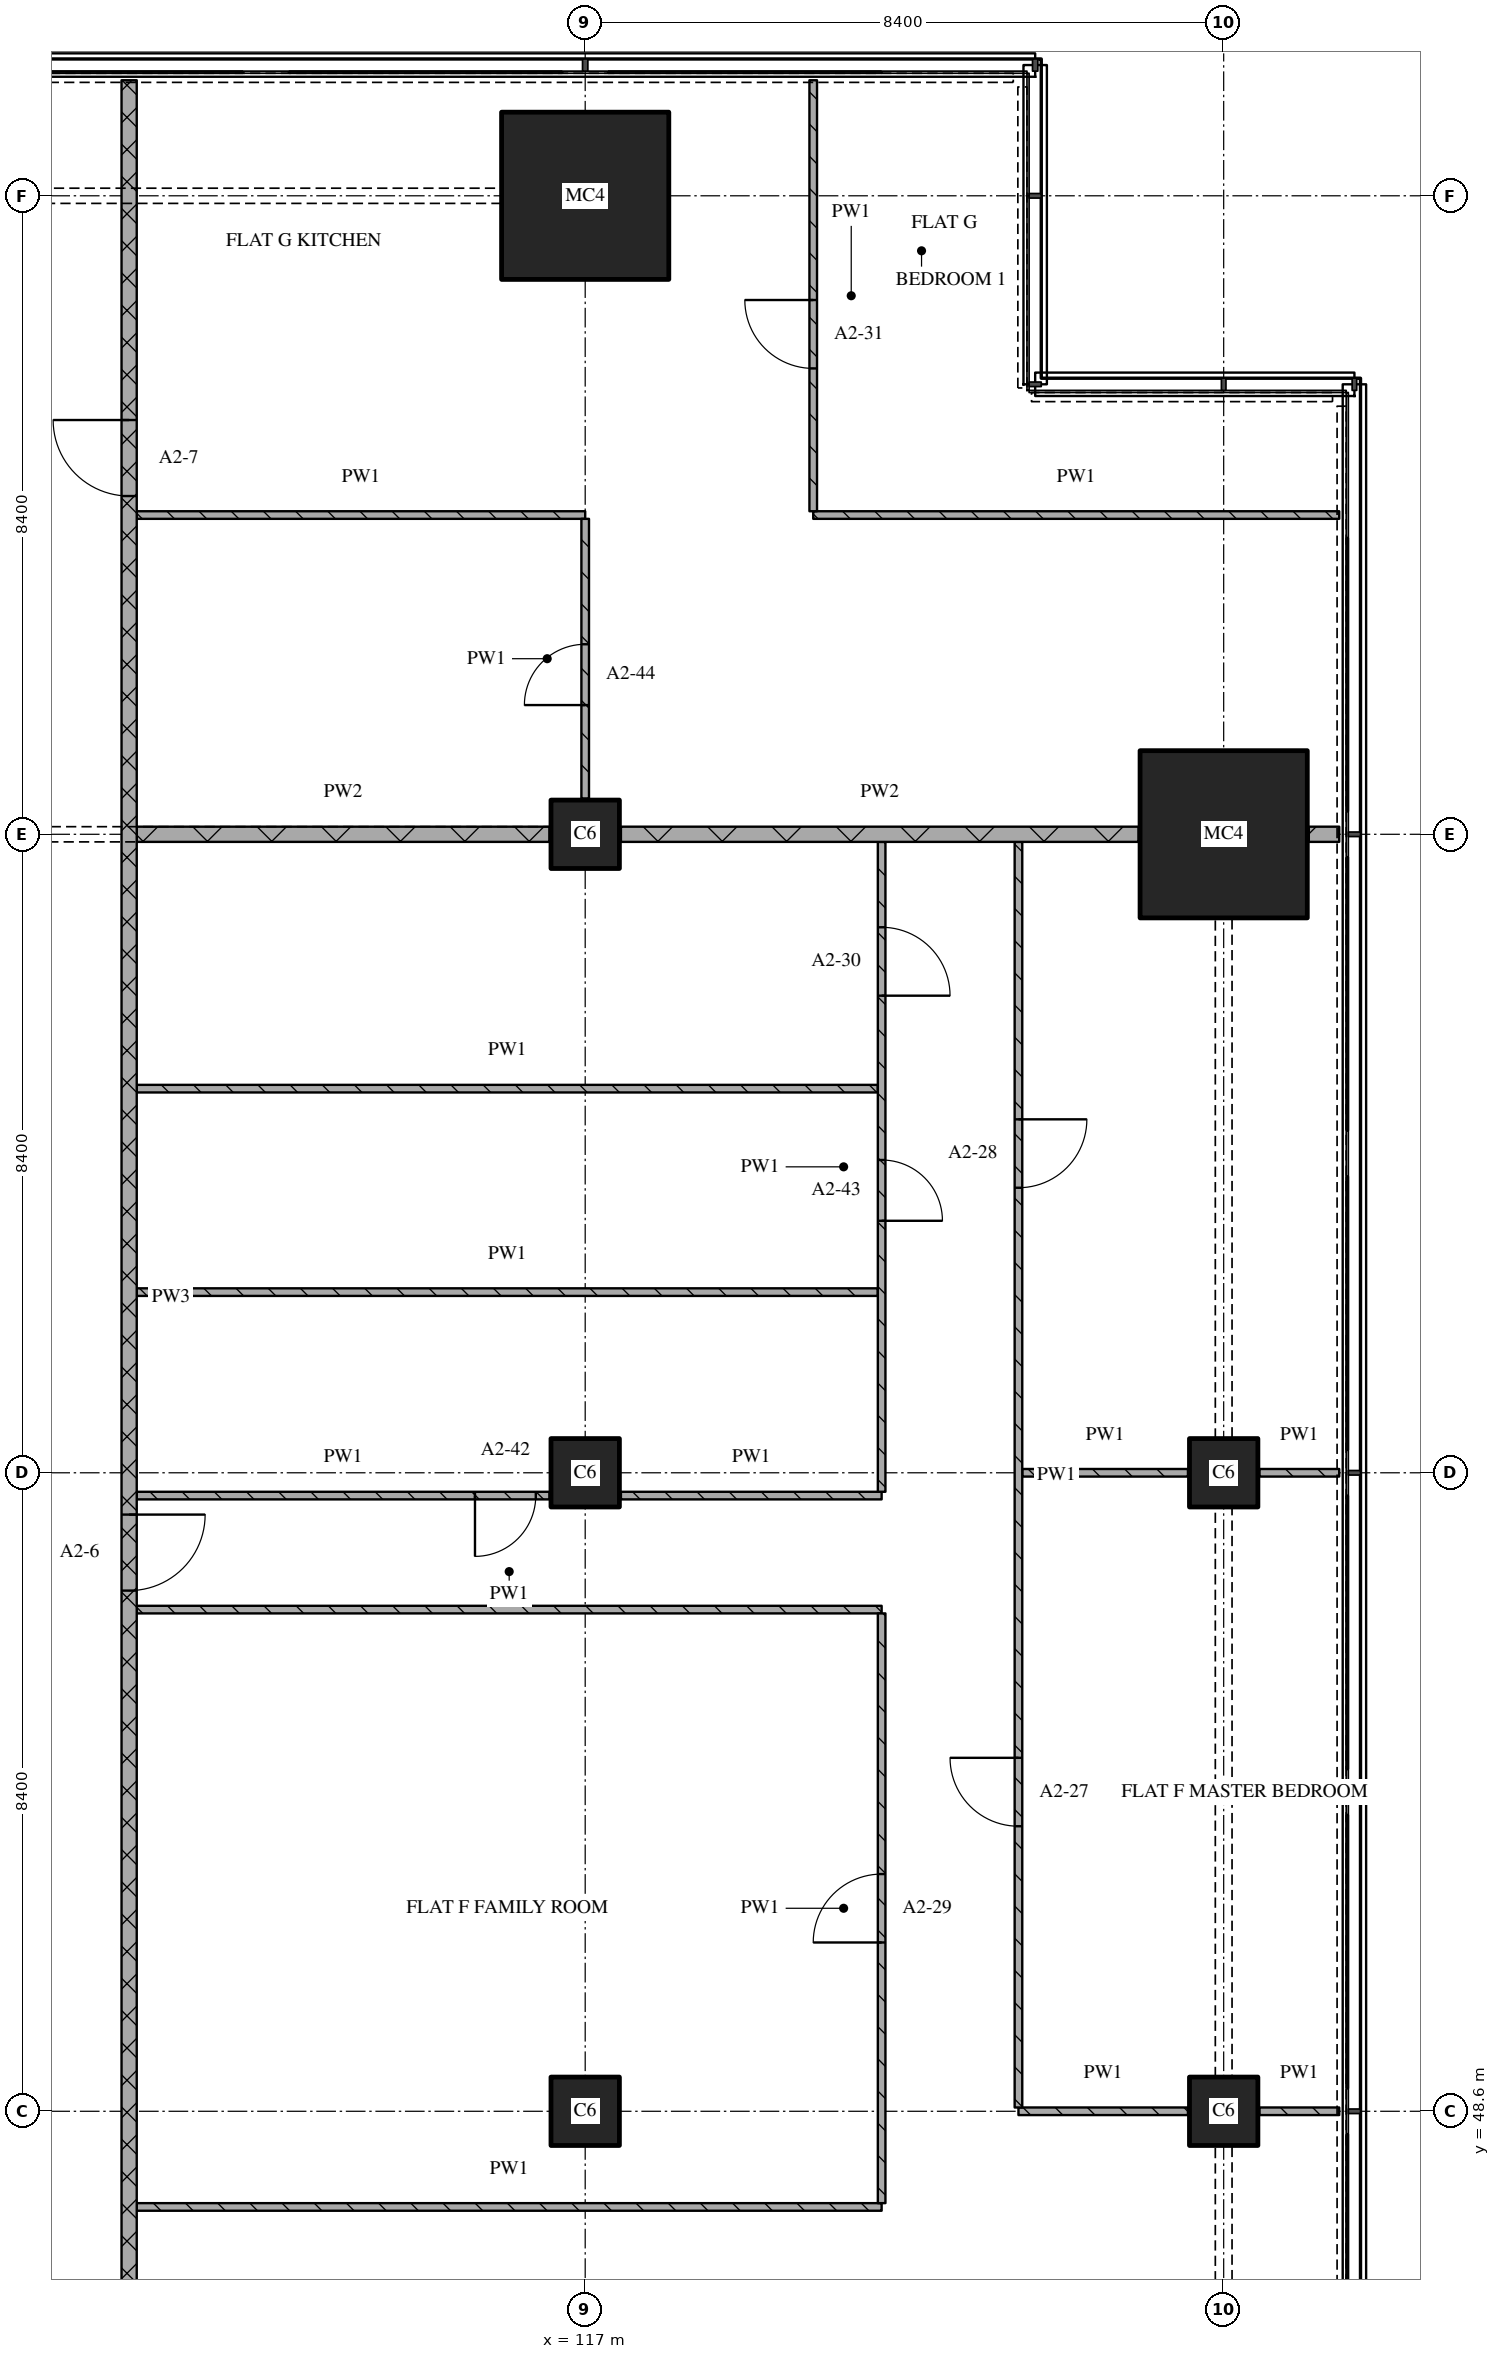
"""IFC4 building model, lengths in metres.
Left out: names, types, materials, properties, quantities, classifications, styles, units other than length and angle.
Written with IfcOpenShell. Run it as: python <this file> out.ifc"""

import sys

from ifc_helpers import new_model, si_unit, direction, frame, frame_2d, origin, origin_2d, place, context, subcontext, project, spatial, rectangle, extrude, element, fill, save


model = new_model("IFC4")
c1 = context("Model", 3, precision=1e-05, world=origin(), true_north=direction((0.0, 1.0)))
c2 = subcontext(c1, "Body", "Model", "MODEL_VIEW")
j1 = project(units=[si_unit("LENGTHUNIT", "METRE"), si_unit("PLANEANGLEUNIT", "RADIAN")], contexts=[c1])
p1 = place(None, origin())
s1 = spatial("IfcSite", under=j1, at=p1, CompositionType="ELEMENT")
p2 = place(p1, origin())
s2 = spatial("IfcBuilding", under=s1, at=p2, CompositionType="ELEMENT")
p3 = place(p2, frame((0.0, 0.0, 51.6)))
s3 = spatial("IfcBuildingStorey", under=s2, at=p3, CompositionType="ELEMENT", Elevation=51.6)
for number, where, z_axis, x_axis in (
    (1, (117.0, 48.6, 0.0), (0.0, 0.0, 1.0), (1.0, 0.0, 0.0)),
    (2, (117.0, 57.0, 0.0), (0.0, 0.0, 1.0), (1.0, 0.0, 0.0)),
    (3, (117.0, 65.4, 0.0), (0.0, 0.0, 1.0), (1.0, 0.0, 0.0)),
):
    element("IfcColumn", number, at=place(p3, frame(where, z_axis=z_axis, x_axis=x_axis)), inside=s3, PredefinedType="COLUMN", context=c2, shape_type="SweptSolid", body=[
        extrude(rectangle(XDim=0.9, YDim=0.9, at=origin_2d()), origin(), (0.0, 0.0, 1.0), 3.6),
    ])
p4 = place(p3, frame((117.0, 73.8, 0.0), z_axis=(0.0, 0.0, 1.0), x_axis=(1.0, 0.0, 0.0)))
e4 = element("IfcColumn", 4, at=p4, inside=s3, PredefinedType="COLUMN", context=c2, shape_type="SweptSolid", body=[
    extrude(rectangle(XDim=2.2, YDim=2.2, at=origin_2d()), origin(), (0.0, 0.0, 1.0), 3.6),
])
for number, where, z_axis, x_axis in (
    (5, (125.4, 48.6, 0.0), (0.0, 0.0, 1.0), (1.0, 0.0, 0.0)),
    (6, (125.4, 57.0, 0.0), (0.0, 0.0, 1.0), (1.0, 0.0, 0.0)),
):
    element("IfcColumn", number, at=place(p3, frame(where, z_axis=z_axis, x_axis=x_axis)), inside=s3, PredefinedType="COLUMN", context=c2, shape_type="SweptSolid", body=[
        extrude(rectangle(XDim=0.9, YDim=0.9, at=origin_2d()), origin(), (0.0, 0.0, 1.0), 3.6),
    ])
p5 = place(p3, frame((125.4, 65.4, 0.0), z_axis=(0.0, 0.0, 1.0), x_axis=(1.0, 0.0, 0.0)))
e7 = element("IfcColumn", 7, at=p5, inside=s3, PredefinedType="COLUMN", context=c2, shape_type="SweptSolid", body=[
    extrude(rectangle(XDim=2.2, YDim=2.2, at=origin_2d()), origin(), (0.0, 0.0, 1.0), 3.6),
])
p6 = place(p3, frame((111.1, 47.341, 0.0), z_axis=(0.0, 0.0, 1.0), x_axis=(1.0, 0.0, 0.0)))
e8 = element("IfcWall", 8, at=p6, inside=s3, PredefinedType="PARTITIONING", context=c2, shape_type="SweptSolid", body=[
    extrude(rectangle(XDim=9.8, YDim=0.1, at=frame_2d((4.9, 0.0))), origin(), (0.0, 0.0, 1.0), 3.32),
])
p7 = place(p3, frame((122.7, 48.6, 0.0), z_axis=(0.0, 0.0, 1.0), x_axis=(1.0, 0.0, 0.0)))
e9 = element("IfcWall", 9, at=p7, inside=s3, PredefinedType="PARTITIONING", context=c2, shape_type="SweptSolid", body=[
    extrude(rectangle(XDim=2.23, YDim=0.1, at=frame_2d((1.115, 0.0))), origin(), (0.0, 0.0, 1.0), 3.32),
])
p8 = place(p3, frame((125.87, 48.6, 0.0), z_axis=(0.0, 0.0, 1.0), x_axis=(1.0, 0.0, 0.0)))
e10 = element("IfcWall", 10, at=p8, inside=s3, PredefinedType="PARTITIONING", context=c2, shape_type="SweptSolid", body=[
    extrude(rectangle(XDim=1.05, YDim=0.1, at=frame_2d((0.525, 0.0))), origin(), (0.0, 0.0, 1.0), 3.32),
])
p9 = place(p3, frame((111.1, 55.2, 0.0), z_axis=(0.0, 0.0, 1.0), x_axis=(1.0, 0.0, 0.0)))
e11 = element("IfcWall", 11, at=p9, inside=s3, PredefinedType="PARTITIONING", context=c2, shape_type="SweptSolid", body=[
    extrude(rectangle(XDim=9.8, YDim=0.1, at=frame_2d((4.9, 0.0))), origin(), (0.0, 0.0, 1.0), 3.32),
])
p10 = place(p3, frame((111.1, 56.7, 0.0), z_axis=(0.0, 0.0, 1.0), x_axis=(1.0, 0.0, 0.0)))
e12 = element("IfcWall", 12, at=p10, inside=s3, PredefinedType="PARTITIONING", context=c2, shape_type="SweptSolid", body=[
    extrude(rectangle(XDim=5.43, YDim=0.1, at=frame_2d((2.715, 0.0))), origin(), (0.0, 0.0, 1.0), 3.32),
])
p11 = place(p10, frame((4.45, 0.0, 0.0)))
e13 = element("IfcOpeningElement", 13, at=p11, cuts=e12, PredefinedType="OPENING", context=c2, shape_type="SweptSolid", body=[
    extrude(rectangle(XDim=0.8, YDim=2.1, at=frame_2d((0.4, 1.05))), frame((0.0, 0.06, 0.0), z_axis=(0.0, -1.0, 0.0), x_axis=(1.0, 0.0, 0.0)), (0.0, 0.0, 1.0), 0.12),
])
p12 = place(p3, frame((117.47, 56.7, 0.0), z_axis=(0.0, 0.0, 1.0), x_axis=(1.0, 0.0, 0.0)))
e14 = element("IfcWall", 14, at=p12, inside=s3, PredefinedType="PARTITIONING", context=c2, shape_type="SweptSolid", body=[
    extrude(rectangle(XDim=3.43, YDim=0.1, at=frame_2d((1.715, 0.0))), origin(), (0.0, 0.0, 1.0), 3.32),
])
p13 = place(p3, frame((122.75, 57.0, 0.0), z_axis=(0.0, 0.0, 1.0), x_axis=(1.0, 0.0, 0.0)))
e15 = element("IfcWall", 15, at=p13, inside=s3, PredefinedType="PARTITIONING", context=c2, shape_type="SweptSolid", body=[
    extrude(rectangle(XDim=2.18, YDim=0.1, at=frame_2d((1.09, 0.0))), origin(), (0.0, 0.0, 1.0), 3.32),
])
p14 = place(p3, frame((125.87, 57.0, 0.0), z_axis=(0.0, 0.0, 1.0), x_axis=(1.0, 0.0, 0.0)))
e16 = element("IfcWall", 16, at=p14, inside=s3, PredefinedType="PARTITIONING", context=c2, shape_type="SweptSolid", body=[
    extrude(rectangle(XDim=1.05, YDim=0.1, at=frame_2d((0.525, 0.0))), origin(), (0.0, 0.0, 1.0), 3.32),
])
for number, where, z_axis, x_axis in (
    (17, (111.1, 59.377, 0.0), (0.0, 0.0, 1.0), (1.0, 0.0, 0.0)),
    (18, (111.1, 62.053, 0.0), (0.0, 0.0, 1.0), (1.0, 0.0, 0.0)),
):
    element("IfcWall", number, at=place(p3, frame(where, z_axis=z_axis, x_axis=x_axis)), inside=s3, PredefinedType="PARTITIONING", context=c2, shape_type="SweptSolid", body=[
        extrude(rectangle(XDim=9.75, YDim=0.1, at=frame_2d((4.875, 0.0))), origin(), (0.0, 0.0, 1.0), 3.32),
    ])
p15 = place(p3, frame((111.1, 65.4, 0.0), z_axis=(0.0, 0.0, 1.0), x_axis=(1.0, 0.0, 0.0)))
e19 = element("IfcWall", 19, at=p15, inside=s3, PredefinedType="PARTITIONING", context=c2, shape_type="SweptSolid", body=[
    extrude(rectangle(XDim=5.43, YDim=0.2, at=frame_2d((2.715, 0.0))), origin(), (0.0, 0.0, 1.0), 2.82),
])
p16 = place(p3, frame((117.47, 65.4, 0.0), z_axis=(0.0, 0.0, 1.0), x_axis=(1.0, 0.0, 0.0)))
e20 = element("IfcWall", 20, at=p16, inside=s3, PredefinedType="PARTITIONING", context=c2, shape_type="SweptSolid", body=[
    extrude(rectangle(XDim=6.81, YDim=0.2, at=frame_2d((3.405, 0.0))), origin(), (0.0, 0.0, 1.0), 3.32),
])
p17 = place(p3, frame((126.52, 65.4, 0.0), z_axis=(0.0, 0.0, 1.0), x_axis=(1.0, 0.0, 0.0)))
e21 = element("IfcWall", 21, at=p17, inside=s3, PredefinedType="PARTITIONING", context=c2, shape_type="SweptSolid", body=[
    extrude(rectangle(XDim=0.4, YDim=0.2, at=frame_2d((0.2, 0.0))), origin(), (0.0, 0.0, 1.0), 3.32),
])
p18 = place(p3, frame((111.1, 69.6, 0.0), z_axis=(0.0, 0.0, 1.0), x_axis=(1.0, 0.0, 0.0)))
e22 = element("IfcWall", 22, at=p18, inside=s3, PredefinedType="PARTITIONING", context=c2, shape_type="SweptSolid", body=[
    extrude(rectangle(XDim=5.9, YDim=0.1, at=frame_2d((2.95, 0.0))), origin(), (0.0, 0.0, 1.0), 3.32),
])
p19 = place(p3, frame((120.0, 69.6, 0.0), z_axis=(0.0, 0.0, 1.0), x_axis=(1.0, 0.0, 0.0)))
e23 = element("IfcWall", 23, at=p19, inside=s3, PredefinedType="PARTITIONING", context=c2, shape_type="SweptSolid", body=[
    extrude(rectangle(XDim=6.92, YDim=0.1, at=frame_2d((3.46, 0.0))), origin(), (0.0, 0.0, 1.0), 3.32),
])
p20 = place(p3, frame((111.0, 75.32, 0.0), z_axis=(0.0, 0.0, 1.0), x_axis=(0.0, -1.0, 0.0)))
e24 = element("IfcWall", 24, at=p20, inside=s3, PredefinedType="PARTITIONING", context=c2, shape_type="SweptSolid", body=[
    extrude(rectangle(XDim=32.02, YDim=0.2, at=frame_2d((16.01, 0.0))), origin(), (0.0, 0.0, 1.0), 3.32),
])
p21 = place(p20, frame((4.47, 0.0, 0.0)))
e25 = element("IfcOpeningElement", 25, at=p21, cuts=e24, PredefinedType="OPENING", context=c2, shape_type="SweptSolid", body=[
    extrude(rectangle(XDim=1.0, YDim=2.1, at=frame_2d((0.5, 1.05))), frame((0.0, 0.11, 0.0), z_axis=(0.0, -1.0, 0.0), x_axis=(1.0, 0.0, 0.0)), (0.0, 0.0, 1.0), 0.22),
])
p22 = place(p20, frame((18.87, 0.0, 0.0)))
e26 = element("IfcOpeningElement", 26, at=p22, cuts=e24, PredefinedType="OPENING", context=c2, shape_type="SweptSolid", body=[
    extrude(rectangle(XDim=1.0, YDim=2.1, at=frame_2d((0.5, 1.05))), frame((0.0, 0.11, 0.0), z_axis=(0.0, -1.0, 0.0), x_axis=(1.0, 0.0, 0.0)), (0.0, 0.0, 1.0), 0.22),
])
p23 = place(p3, frame((117.0, 65.87, 0.0), z_axis=(0.0, 0.0, 1.0), x_axis=(0.0, 1.0, 0.0)))
e27 = element("IfcWall", 27, at=p23, inside=s3, PredefinedType="PARTITIONING", context=c2, shape_type="SweptSolid", body=[
    extrude(rectangle(XDim=3.68, YDim=0.1, at=frame_2d((1.84, 0.0))), origin(), (0.0, 0.0, 1.0), 3.32),
])
p24 = place(p23, frame((1.23, 0.0, 0.0)))
e28 = element("IfcOpeningElement", 28, at=p24, cuts=e27, PredefinedType="OPENING", context=c2, shape_type="SweptSolid", body=[
    extrude(rectangle(XDim=0.8, YDim=2.1, at=frame_2d((0.4, 1.05))), frame((0.0, 0.06, 0.0), z_axis=(0.0, -1.0, 0.0), x_axis=(1.0, 0.0, 0.0)), (0.0, 0.0, 1.0), 0.12),
])
p25 = place(p3, frame((120.0, 75.32, 0.0), z_axis=(0.0, 0.0, 1.0), x_axis=(0.0, -1.0, 0.0)))
e29 = element("IfcWall", 29, at=p25, inside=s3, PredefinedType="PARTITIONING", context=c2, shape_type="SweptSolid", body=[
    extrude(rectangle(XDim=5.67, YDim=0.1, at=frame_2d((2.835, 0.0))), origin(), (0.0, 0.0, 1.0), 3.32),
])
p26 = place(p25, frame((2.891, 0.0, 0.0)))
e30 = element("IfcOpeningElement", 30, at=p26, cuts=e29, PredefinedType="OPENING", context=c2, shape_type="SweptSolid", body=[
    extrude(rectangle(XDim=0.9, YDim=2.1, at=frame_2d((0.45, 1.05))), frame((0.0, 0.06, 0.0), z_axis=(0.0, -1.0, 0.0), x_axis=(1.0, 0.0, 0.0)), (0.0, 0.0, 1.0), 0.12),
])
p27 = place(p3, frame((120.9, 47.391, 0.0), z_axis=(0.0, 0.0, 1.0), x_axis=(0.0, 1.0, 0.0)))
e31 = element("IfcWall", 31, at=p27, inside=s3, PredefinedType="PARTITIONING", context=c2, shape_type="SweptSolid", body=[
    extrude(rectangle(XDim=7.759, YDim=0.1, at=frame_2d((3.879, 0.0))), origin(), (0.0, 0.0, 1.0), 3.32),
])
p28 = place(p27, frame((3.429, 0.0, 0.0)))
e32 = element("IfcOpeningElement", 32, at=p28, cuts=e31, PredefinedType="OPENING", context=c2, shape_type="SweptSolid", body=[
    extrude(rectangle(XDim=0.9, YDim=2.1, at=frame_2d((0.45, 1.05))), frame((0.0, 0.06, 0.0), z_axis=(0.0, -1.0, 0.0), x_axis=(1.0, 0.0, 0.0)), (0.0, 0.0, 1.0), 0.12),
])
p29 = place(p3, frame((120.9, 56.75, 0.0), z_axis=(0.0, 0.0, 1.0), x_axis=(0.0, 1.0, 0.0)))
e33 = element("IfcWall", 33, at=p29, inside=s3, PredefinedType="PARTITIONING", context=c2, shape_type="SweptSolid", body=[
    extrude(rectangle(XDim=8.55, YDim=0.1, at=frame_2d((4.275, 0.0))), origin(), (0.0, 0.0, 1.0), 3.32),
])
p30 = place(p29, frame((3.565, 0.0, 0.0)))
e34 = element("IfcOpeningElement", 34, at=p30, cuts=e33, PredefinedType="OPENING", context=c2, shape_type="SweptSolid", body=[
    extrude(rectangle(XDim=0.8, YDim=2.1, at=frame_2d((0.4, 1.05))), frame((0.0, 0.06, 0.0), z_axis=(0.0, -1.0, 0.0), x_axis=(1.0, 0.0, 0.0)), (0.0, 0.0, 1.0), 0.12),
])
p31 = place(p29, frame((6.527, 0.0, 0.0)))
e35 = element("IfcOpeningElement", 35, at=p31, cuts=e33, PredefinedType="OPENING", context=c2, shape_type="SweptSolid", body=[
    extrude(rectangle(XDim=0.9, YDim=2.1, at=frame_2d((0.45, 1.05))), frame((0.0, 0.06, 0.0), z_axis=(0.0, -1.0, 0.0), x_axis=(1.0, 0.0, 0.0)), (0.0, 0.0, 1.0), 0.12),
])
p32 = place(p3, frame((122.7, 65.3, 0.0), z_axis=(0.0, 0.0, 1.0), x_axis=(0.0, -1.0, 0.0)))
e36 = element("IfcWall", 36, at=p32, inside=s3, PredefinedType="PARTITIONING", context=c2, shape_type="SweptSolid", body=[
    extrude(rectangle(XDim=16.65, YDim=0.1, at=frame_2d((8.325, 0.0))), origin(), (0.0, 0.0, 1.0), 3.32),
])
p33 = place(p32, frame((3.65, 0.0, 0.0)))
e37 = element("IfcOpeningElement", 37, at=p33, cuts=e36, PredefinedType="OPENING", context=c2, shape_type="SweptSolid", body=[
    extrude(rectangle(XDim=0.9, YDim=2.1, at=frame_2d((0.45, 1.05))), frame((0.0, 0.06, 0.0), z_axis=(0.0, -1.0, 0.0), x_axis=(1.0, 0.0, 0.0)), (0.0, 0.0, 1.0), 0.12),
])
p34 = place(p32, frame((12.05, 0.0, 0.0)))
e38 = element("IfcOpeningElement", 38, at=p34, cuts=e36, PredefinedType="OPENING", context=c2, shape_type="SweptSolid", body=[
    extrude(rectangle(XDim=0.9, YDim=2.1, at=frame_2d((0.45, 1.05))), frame((0.0, 0.06, 0.0), z_axis=(0.0, -1.0, 0.0), x_axis=(1.0, 0.0, 0.0)), (0.0, 0.0, 1.0), 0.12),
])
p35 = place(p11, origin())
e39 = element("IfcDoor", 39, at=p35, inside=s3, OperationType="SINGLE_SWING_RIGHT", PredefinedType="DOOR", context=c2, shape_type="SweptSolid", body=[
    extrude(rectangle(XDim=0.8, YDim=2.1, at=frame_2d((0.4, 1.05))), frame((0.0, 0.025, 0.0), z_axis=(0.0, -1.0, 0.0), x_axis=(1.0, 0.0, 0.0)), (0.0, 0.0, 1.0), 0.05),
])
fill(e13, e39)
p36 = place(p21, origin())
e40 = element("IfcDoor", 40, at=p36, inside=s3, OperationType="SINGLE_SWING_RIGHT", PredefinedType="DOOR", context=c2, shape_type="SweptSolid", body=[
    extrude(rectangle(XDim=1.0, YDim=2.1, at=frame_2d((0.5, 1.05))), frame((0.0, 0.025, 0.0), z_axis=(0.0, -1.0, 0.0), x_axis=(1.0, 0.0, 0.0)), (0.0, 0.0, 1.0), 0.05),
])
fill(e25, e40)
p37 = place(p22, origin())
e41 = element("IfcDoor", 41, at=p37, inside=s3, OperationType="SINGLE_SWING_LEFT", PredefinedType="DOOR", context=c2, shape_type="SweptSolid", body=[
    extrude(rectangle(XDim=1.0, YDim=2.1, at=frame_2d((0.5, 1.05))), frame((0.0, 0.025, 0.0), z_axis=(0.0, -1.0, 0.0), x_axis=(1.0, 0.0, 0.0)), (0.0, 0.0, 1.0), 0.05),
])
fill(e26, e41)
p38 = place(p24, origin())
e42 = element("IfcDoor", 42, at=p38, inside=s3, OperationType="SINGLE_SWING_LEFT", PredefinedType="DOOR", context=c2, shape_type="SweptSolid", body=[
    extrude(rectangle(XDim=0.8, YDim=2.1, at=frame_2d((0.4, 1.05))), frame((0.0, 0.025, 0.0), z_axis=(0.0, -1.0, 0.0), x_axis=(1.0, 0.0, 0.0)), (0.0, 0.0, 1.0), 0.05),
])
fill(e28, e42)
p39 = place(p26, origin())
e43 = element("IfcDoor", 43, at=p39, inside=s3, OperationType="SINGLE_SWING_RIGHT", PredefinedType="DOOR", context=c2, shape_type="SweptSolid", body=[
    extrude(rectangle(XDim=0.9, YDim=2.1, at=frame_2d((0.45, 1.05))), frame((0.0, 0.025, 0.0), z_axis=(0.0, -1.0, 0.0), x_axis=(1.0, 0.0, 0.0)), (0.0, 0.0, 1.0), 0.05),
])
fill(e30, e43)
p40 = place(p28, origin())
e44 = element("IfcDoor", 44, at=p40, inside=s3, OperationType="SINGLE_SWING_LEFT", PredefinedType="DOOR", context=c2, shape_type="SweptSolid", body=[
    extrude(rectangle(XDim=0.9, YDim=2.1, at=frame_2d((0.45, 1.05))), frame((0.0, 0.025, 0.0), z_axis=(0.0, -1.0, 0.0), x_axis=(1.0, 0.0, 0.0)), (0.0, 0.0, 1.0), 0.05),
])
fill(e32, e44)
p41 = place(p30, origin())
e45 = element("IfcDoor", 45, at=p41, inside=s3, OperationType="SINGLE_SWING_RIGHT", PredefinedType="DOOR", context=c2, shape_type="SweptSolid", body=[
    extrude(rectangle(XDim=0.8, YDim=2.1, at=frame_2d((0.4, 1.05))), frame((0.0, 0.025, 0.0), z_axis=(0.0, -1.0, 0.0), x_axis=(1.0, 0.0, 0.0)), (0.0, 0.0, 1.0), 0.05),
])
fill(e34, e45)
p42 = place(p31, origin())
e46 = element("IfcDoor", 46, at=p42, inside=s3, OperationType="SINGLE_SWING_RIGHT", PredefinedType="DOOR", context=c2, shape_type="SweptSolid", body=[
    extrude(rectangle(XDim=0.9, YDim=2.1, at=frame_2d((0.45, 1.05))), frame((0.0, 0.025, 0.0), z_axis=(0.0, -1.0, 0.0), x_axis=(1.0, 0.0, 0.0)), (0.0, 0.0, 1.0), 0.05),
])
fill(e35, e46)
p43 = place(p33, origin())
e47 = element("IfcDoor", 47, at=p43, inside=s3, OperationType="SINGLE_SWING_LEFT", PredefinedType="DOOR", context=c2, shape_type="SweptSolid", body=[
    extrude(rectangle(XDim=0.9, YDim=2.1, at=frame_2d((0.45, 1.05))), frame((0.0, 0.025, 0.0), z_axis=(0.0, -1.0, 0.0), x_axis=(1.0, 0.0, 0.0)), (0.0, 0.0, 1.0), 0.05),
])
fill(e37, e47)
p44 = place(p34, origin())
e48 = element("IfcDoor", 48, at=p44, inside=s3, OperationType="SINGLE_SWING_RIGHT", PredefinedType="DOOR", context=c2, shape_type="SweptSolid", body=[
    extrude(rectangle(XDim=0.9, YDim=2.1, at=frame_2d((0.45, 1.05))), frame((0.0, 0.025, 0.0), z_axis=(0.0, -1.0, 0.0), x_axis=(1.0, 0.0, 0.0)), (0.0, 0.0, 1.0), 0.05),
])
fill(e38, e48)
save(model, sys.argv[1])
